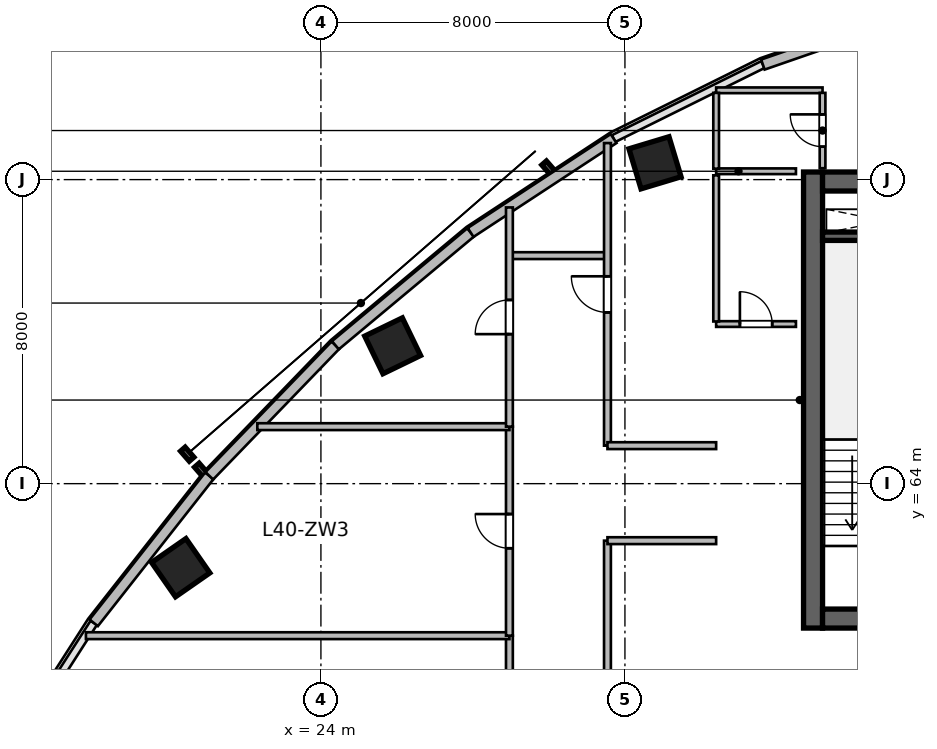
"""IFC4 building model, lengths in metres.
Left out: names, types, materials, properties, quantities, classifications, styles, units other than length and angle.
Written with IfcOpenShell. Run it as: python <this file> out.ifc"""

import sys

from ifc_helpers import new_model, si_unit, direction, frame, frame_2d, origin, origin_2d, place, context, subcontext, project, spatial, rectangle, extrude, source, transform, mapped, element, fill, save


model = new_model("IFC4")
c1 = context("Model", 3, precision=1e-05, world=origin(), true_north=direction((0.0, 1.0)))
c2 = subcontext(c1, "Body", "Model", "MODEL_VIEW")
j1 = project(units=[si_unit("LENGTHUNIT", "METRE"), si_unit("PLANEANGLEUNIT", "RADIAN")], contexts=[c1])
p1 = place(None, origin())
s1 = spatial("IfcSite", under=j1, at=p1, CompositionType="ELEMENT")
p2 = place(p1, origin())
s2 = spatial("IfcBuilding", under=s1, at=p2, CompositionType="ELEMENT")
p3 = place(p2, frame((0.0, 0.0, 166.2)))
s3 = spatial("IfcBuildingStorey", under=s2, at=p3, CompositionType="ELEMENT", Elevation=166.2)
m1 = source(origin(), c2, "Body", "SweptSolid", [
    extrude(rectangle(XDim=12.0, YDim=0.5, at=frame_2d((6.0, 0.0))), origin(), (0.0, 0.0, 1.0), 3.9),
])
p4 = place(p3, frame((36.95, 60.2, 0.0), z_axis=(0.0, 0.0, 1.0), x_axis=(0.0, 1.0, 0.0)))
e1 = element("IfcWall", 1, at=p4, inside=s3, PredefinedType="SHEAR", context=c2, shape_type="MappedRepresentation", body=[
    mapped(m1, transform((0.0, 0.0, 0.0), scale=1.0)),
])
m2 = source(origin(), c2, "Body", "SweptSolid", [
    extrude(rectangle(XDim=21.6, YDim=0.5, at=frame_2d((10.8, 0.0))), origin(), (0.0, 0.0, 1.0), 3.9),
])
p5 = place(p3, frame((37.2, 60.45, 0.0), z_axis=(0.0, 0.0, 1.0), x_axis=(1.0, 0.0, 0.0)))
e2 = element("IfcWall", 2, at=p5, inside=s3, PredefinedType="SHEAR", context=c2, shape_type="MappedRepresentation", body=[
    mapped(m2, transform((0.0, 0.0, 0.0), scale=1.0)),
])
p6 = place(p5, frame((1.1, 0.0, 0.0)))
e3 = element("IfcOpeningElement", 3, at=p6, cuts=e2, PredefinedType="OPENING", context=c2, shape_type="SweptSolid", body=[
    extrude(rectangle(XDim=1.15, YDim=2.15, at=frame_2d((0.575, 1.075))), frame((0.0, 0.26, 0.0), z_axis=(0.0, -1.0, 0.0), x_axis=(1.0, 0.0, 0.0)), (0.0, 0.0, 1.0), 0.52),
])
p7 = place(p5, frame((19.5, 0.0, 0.0)))
e4 = element("IfcOpeningElement", 4, at=p7, cuts=e2, PredefinedType="OPENING", context=c2, shape_type="SweptSolid", body=[
    extrude(rectangle(XDim=0.9, YDim=2.1, at=frame_2d((0.45, 1.05))), frame((0.0, 0.26, 0.0), z_axis=(0.0, -1.0, 0.0), x_axis=(1.0, 0.0, 0.0)), (0.0, 0.0, 1.0), 0.52),
])
p8 = place(p5, frame((12.02, 0.0, 0.0)))
e5 = element("IfcOpeningElement", 5, at=p8, cuts=e2, PredefinedType="OPENING", context=c2, shape_type="SweptSolid", body=[
    extrude(rectangle(XDim=1.6, YDim=2.15, at=frame_2d((0.8, 1.075))), frame((0.0, 0.26, 0.0), z_axis=(0.0, -1.0, 0.0), x_axis=(1.0, 0.0, 0.0)), (0.0, 0.0, 1.0), 0.52),
])
p9 = place(p3, frame((37.2, 71.95, 0.0), z_axis=(0.0, 0.0, 1.0), x_axis=(1.0, 0.0, 0.0)))
e6 = element("IfcWall", 6, at=p9, inside=s3, PredefinedType="SHEAR", context=c2, shape_type="MappedRepresentation", body=[
    mapped(m2, transform((0.0, 0.0, 0.0), scale=1.0)),
])
p10 = place(p9, frame((1.2, 0.0, 0.0)))
e7 = element("IfcOpeningElement", 7, at=p10, cuts=e6, PredefinedType="OPENING", context=c2, shape_type="SweptSolid", body=[
    extrude(rectangle(XDim=0.9, YDim=2.1, at=frame_2d((0.45, 1.05))), frame((0.0, 0.26, 0.0), z_axis=(0.0, -1.0, 0.0), x_axis=(1.0, 0.0, 0.0)), (0.0, 0.0, 1.0), 0.52),
])
p11 = place(p9, frame((14.7, 0.0, 0.0)))
e8 = element("IfcOpeningElement", 8, at=p11, cuts=e6, PredefinedType="OPENING", context=c2, shape_type="SweptSolid", body=[
    extrude(rectangle(XDim=1.2, YDim=2.15, at=frame_2d((0.6, 1.075))), frame((0.0, 0.26, 0.0), z_axis=(0.0, -1.0, 0.0), x_axis=(1.0, 0.0, 0.0)), (0.0, 0.0, 1.0), 0.52),
])
p12 = place(p9, frame((4.15, 0.0, 0.0)))
e9 = element("IfcOpeningElement", 9, at=p12, cuts=e6, PredefinedType="OPENING", context=c2, shape_type="SweptSolid", body=[
    extrude(rectangle(XDim=1.3, YDim=2.15, at=frame_2d((0.65, 1.075))), frame((0.0, 0.26, 0.0), z_axis=(0.0, -1.0, 0.0), x_axis=(1.0, 0.0, 0.0)), (0.0, 0.0, 1.0), 0.52),
])
p13 = place(p9, frame((7.25, 0.0, 0.0)))
e10 = element("IfcOpeningElement", 10, at=p13, cuts=e6, PredefinedType="OPENING", context=c2, shape_type="SweptSolid", body=[
    extrude(rectangle(XDim=0.9, YDim=2.1, at=frame_2d((0.45, 1.05))), frame((0.0, 0.26, 0.0), z_axis=(0.0, -1.0, 0.0), x_axis=(1.0, 0.0, 0.0)), (0.0, 0.0, 1.0), 0.52),
])
p14 = place(p9, frame((10.95, 0.0, 0.0)))
e11 = element("IfcOpeningElement", 11, at=p14, cuts=e6, PredefinedType="OPENING", context=c2, shape_type="SweptSolid", body=[
    extrude(rectangle(XDim=0.9, YDim=2.1, at=frame_2d((0.45, 1.05))), frame((0.0, 0.26, 0.0), z_axis=(0.0, -1.0, 0.0), x_axis=(1.0, 0.0, 0.0)), (0.0, 0.0, 1.0), 0.52),
])
m3 = source(origin(), c2, "Body", "SweptSolid", [
    extrude(rectangle(XDim=3.27, YDim=0.22, at=frame_2d((1.635, 0.0))), origin(), (0.0, 0.0, 1.0), 3.9),
])
p15 = place(p3, frame((37.2, 70.51, 0.0), z_axis=(0.0, 0.0, 1.0), x_axis=(1.0, 0.0, 0.0)))
e12 = element("IfcWall", 12, at=p15, inside=s3, PredefinedType="SHEAR", context=c2, shape_type="MappedRepresentation", body=[
    mapped(m3, transform((0.0, 0.0, 0.0), scale=1.0)),
])
m4 = source(origin(), c2, "Body", "SweptSolid", [
    extrude(rectangle(XDim=1.1, YDim=1.1, at=origin_2d()), origin(), (0.0, 0.0, 1.0), 3.9),
])
for number, where, z_axis, x_axis in (
    (13, (20.311, 61.789, 0.0), (0.0, 0.0, 1.0), (-0.571, 0.821, 0.0)),
    (14, (25.888, 67.627, 0.0), (0.0, 0.0, 1.0), (-0.436, 0.9, 0.0)),
    (15, (32.791, 72.442, 0.0), (0.0, 0.0, 1.0), (-0.289, 0.957, 0.0)),
):
    element("IfcColumn", number, at=place(p3, frame(where, z_axis=z_axis, x_axis=x_axis)), inside=s3, PredefinedType="COLUMN", context=c2, shape_type="MappedRepresentation", body=[
        mapped(m4, transform((0.0, 0.0, 0.0), scale=1.0)),
    ])
m5 = source(origin(), c2, "Body", "SweptSolid", [
    extrude(rectangle(XDim=4.922, YDim=0.28, at=frame_2d((2.461, 0.0))), origin(), (0.0, 0.0, 1.0), 3.65),
])
p16 = place(p3, frame((18.021, 60.338, 0.0), z_axis=(0.0, 0.0, 1.0), x_axis=(0.61817639101, 0.786039407153, 0.0)))
e16 = element("IfcWall", 16, at=p16, inside=s3, PredefinedType="SOLIDWALL", context=c2, shape_type="MappedRepresentation", body=[
    mapped(m5, transform((0.0, 0.0, 0.0), scale=1.0)),
])
m6 = source(origin(), c2, "Body", "SweptSolid", [
    extrude(rectangle(XDim=4.776, YDim=0.28, at=frame_2d((2.388, 0.0))), origin(), (0.0, 0.0, 1.0), 3.65),
])
p17 = place(p3, frame((21.064, 64.206, 0.0), z_axis=(0.0, 0.0, 1.0), x_axis=(0.694601811851, 0.719394414055, 0.0)))
e17 = element("IfcWall", 17, at=p17, inside=s3, PredefinedType="SOLIDWALL", context=c2, shape_type="MappedRepresentation", body=[
    mapped(m6, transform((0.0, 0.0, 0.0), scale=1.0)),
])
m7 = source(origin(), c2, "Body", "SweptSolid", [
    extrude(rectangle(XDim=4.634, YDim=0.28, at=frame_2d((2.317, 0.0))), origin(), (0.0, 0.0, 1.0), 3.65),
])
p18 = place(p3, frame((24.381, 67.642, 0.0), z_axis=(0.0, 0.0, 1.0), x_axis=(0.767910229096, 0.640557475993, 0.0)))
e18 = element("IfcWall", 18, at=p18, inside=s3, PredefinedType="SOLIDWALL", context=c2, shape_type="MappedRepresentation", body=[
    mapped(m7, transform((0.0, 0.0, 0.0), scale=1.0)),
])
m8 = source(origin(), c2, "Body", "SweptSolid", [
    extrude(rectangle(XDim=4.501, YDim=0.28, at=frame_2d((2.25, 0.0))), origin(), (0.0, 0.0, 1.0), 3.65),
])
p19 = place(p3, frame((27.939, 70.61, 0.0), z_axis=(0.0, 0.0, 1.0), x_axis=(0.835984920737, 0.548752414391, 0.0)))
e19 = element("IfcWall", 19, at=p19, inside=s3, PredefinedType="SOLIDWALL", context=c2, shape_type="MappedRepresentation", body=[
    mapped(m8, transform((0.0, 0.0, 0.0), scale=1.0)),
])
m9 = source(origin(), c2, "Body", "SweptSolid", [
    extrude(rectangle(XDim=4.29, YDim=0.28, at=frame_2d((2.145, 0.0))), origin(), (0.0, 0.0, 1.0), 3.65),
])
p20 = place(p3, frame((35.63, 75.027, 0.0), z_axis=(0.0, 0.0, 1.0), x_axis=(0.944883859218, 0.3274057003, 0.0)))
e20 = element("IfcWall", 20, at=p20, inside=s3, PredefinedType="SOLIDWALL", context=c2, shape_type="MappedRepresentation", body=[
    mapped(m9, transform((0.0, 0.0, 0.0), scale=1.0)),
])
m10 = source(origin(), c2, "Body", "SweptSolid", [
    extrude(rectangle(XDim=2.1, YDim=0.15, at=frame_2d((1.05, 0.0))), origin(), (0.0, 0.0, 1.0), 3.65),
])
p21 = place(p3, frame((34.4, 72.22, 0.0), z_axis=(0.0, 0.0, 1.0), x_axis=(1.0, 0.0, 0.0)))
e21 = element("IfcWall", 21, at=p21, inside=s3, PredefinedType="PARTITIONING", context=c2, shape_type="MappedRepresentation", body=[
    mapped(m10, transform((0.0, 0.0, 0.0), scale=1.0)),
])
m11 = source(origin(), c2, "Body", "SweptSolid", [
    extrude(rectangle(XDim=2.8, YDim=0.15, at=frame_2d((1.4, 0.0))), origin(), (0.0, 0.0, 1.0), 3.65),
])
p22 = place(p3, frame((34.4, 74.35, 0.0), z_axis=(0.0, 0.0, 1.0), x_axis=(1.0, 0.0, 0.0)))
e22 = element("IfcWall", 22, at=p22, inside=s3, PredefinedType="PARTITIONING", context=c2, shape_type="MappedRepresentation", body=[
    mapped(m11, transform((0.0, 0.0, 0.0), scale=1.0)),
])
m12 = source(origin(), c2, "Body", "SweptSolid", [
    extrude(rectangle(XDim=1.995, YDim=0.15, at=frame_2d((0.998, 0.0))), origin(), (0.0, 0.0, 1.0), 3.65),
])
p23 = place(p3, frame((34.4, 72.288, 0.0), z_axis=(0.0, 0.0, 1.0), x_axis=(0.0, 1.0, 0.0)))
e23 = element("IfcWall", 23, at=p23, inside=s3, PredefinedType="PARTITIONING", context=c2, shape_type="MappedRepresentation", body=[
    mapped(m12, transform((0.0, 0.0, 0.0), scale=1.0)),
])
m13 = source(origin(), c2, "Body", "SweptSolid", [
    extrude(rectangle(XDim=1.982, YDim=0.15, at=frame_2d((0.991, 0.0))), origin(), (0.0, 0.0, 1.0), 3.65),
])
p24 = place(p3, frame((37.2, 72.3, 0.0), z_axis=(0.0, 0.0, 1.0), x_axis=(0.0, 1.0, 0.0)))
e24 = element("IfcWall", 24, at=p24, inside=s3, PredefinedType="PARTITIONING", context=c2, shape_type="MappedRepresentation", body=[
    mapped(m13, transform((0.0, 0.0, 0.0), scale=1.0)),
])
p25 = place(p24, frame((0.566, 0.0, 0.0)))
e25 = element("IfcOpeningElement", 25, at=p25, cuts=e24, PredefinedType="OPENING", context=c2, shape_type="SweptSolid", body=[
    extrude(rectangle(XDim=0.85, YDim=2.1, at=frame_2d((0.425, 1.05))), frame((0.0, 0.085, 0.0), z_axis=(0.0, -1.0, 0.0), x_axis=(1.0, 0.0, 0.0)), (0.0, 0.0, 1.0), 0.17),
])
p26 = place(p3, frame((34.4, 68.2, 0.0), z_axis=(0.0, 0.0, 1.0), x_axis=(1.0, 0.0, 0.0)))
e26 = element("IfcWall", 26, at=p26, inside=s3, PredefinedType="PARTITIONING", context=c2, shape_type="MappedRepresentation", body=[
    mapped(m10, transform((0.0, 0.0, 0.0), scale=1.0)),
])
p27 = place(p26, frame((0.625, 0.0, 0.0)))
e27 = element("IfcOpeningElement", 27, at=p27, cuts=e26, PredefinedType="OPENING", context=c2, shape_type="SweptSolid", body=[
    extrude(rectangle(XDim=0.85, YDim=2.1, at=frame_2d((0.425, 1.05))), frame((0.0, 0.085, 0.0), z_axis=(0.0, -1.0, 0.0), x_axis=(1.0, 0.0, 0.0)), (0.0, 0.0, 1.0), 0.17),
])
m14 = source(origin(), c2, "Body", "SweptSolid", [
    extrude(rectangle(XDim=3.845, YDim=0.15, at=frame_2d((1.922, 0.0))), origin(), (0.0, 0.0, 1.0), 3.65),
])
p28 = place(p3, frame((34.4, 68.268, 0.0), z_axis=(0.0, 0.0, 1.0), x_axis=(0.0, 1.0, 0.0)))
e28 = element("IfcWall", 28, at=p28, inside=s3, PredefinedType="PARTITIONING", context=c2, shape_type="MappedRepresentation", body=[
    mapped(m14, transform((0.0, 0.0, 0.0), scale=1.0)),
])
m15 = source(origin(), c2, "Body", "SweptSolid", [
    extrude(rectangle(XDim=2.5, YDim=0.18, at=frame_2d((1.25, 0.0))), origin(), (0.0, 0.0, 1.0), 3.022),
])
p29 = place(p3, frame((29.0, 70.0, 0.0), z_axis=(0.0, 0.0, 1.0), x_axis=(1.0, 0.0, 0.0)))
e29 = element("IfcWall", 29, at=p29, inside=s3, PredefinedType="PLUMBINGWALL", context=c2, shape_type="MappedRepresentation", body=[
    mapped(m15, transform((0.0, 0.0, 0.0), scale=1.0)),
])
m16 = source(origin(), c2, "Body", "SweptSolid", [
    extrude(rectangle(XDim=6.5, YDim=0.18, at=frame_2d((3.25, 0.0))), origin(), (0.0, 0.0, 1.0), 3.081),
])
p30 = place(p3, frame((28.96, 53.5, 0.0), z_axis=(0.0, 0.0, 1.0), x_axis=(0.0, 1.0, 0.0)))
e30 = element("IfcWall", 30, at=p30, inside=s3, PredefinedType="PLUMBINGWALL", context=c2, shape_type="MappedRepresentation", body=[
    mapped(m16, transform((0.0, 0.0, 0.0), scale=1.0)),
])
p31 = place(p30, frame((2.8, 0.0, 0.0)))
e31 = element("IfcOpeningElement", 31, at=p31, cuts=e30, PredefinedType="OPENING", context=c2, shape_type="SweptSolid", body=[
    extrude(rectangle(XDim=0.9, YDim=2.08, at=frame_2d((0.45, 1.04))), frame((0.0, 0.1, 0.0), z_axis=(0.0, -1.0, 0.0), x_axis=(1.0, 0.0, 0.0)), (0.0, 0.0, 1.0), 0.2),
])
m17 = source(origin(), c2, "Body", "SweptSolid", [
    extrude(rectangle(XDim=11.144, YDim=0.18, at=frame_2d((5.572, 0.0))), origin(), (0.0, 0.0, 1.0), 3.65),
])
p32 = place(p3, frame((17.816, 60.0, 0.0), z_axis=(0.0, 0.0, 1.0), x_axis=(1.0, 0.0, 0.0)))
e32 = element("IfcWall", 32, at=p32, inside=s3, PredefinedType="PLUMBINGWALL", context=c2, shape_type="MappedRepresentation", body=[
    mapped(m17, transform((0.0, 0.0, 0.0), scale=1.0)),
])
m18 = source(origin(), c2, "Body", "SweptSolid", [
    extrude(rectangle(XDim=5.5, YDim=0.18, at=frame_2d((2.75, 0.0))), origin(), (0.0, 0.0, 1.0), 2.942),
])
p33 = place(p3, frame((28.96, 60.0, 0.0), z_axis=(0.0, 0.0, 1.0), x_axis=(0.0, 1.0, 0.0)))
e33 = element("IfcWall", 33, at=p33, inside=s3, PredefinedType="PLUMBINGWALL", context=c2, shape_type="MappedRepresentation", body=[
    mapped(m18, transform((0.0, 0.0, 0.0), scale=1.0)),
])
p34 = place(p33, frame((2.3, 0.0, 0.0)))
e34 = element("IfcOpeningElement", 34, at=p34, cuts=e33, PredefinedType="OPENING", context=c2, shape_type="SweptSolid", body=[
    extrude(rectangle(XDim=0.9, YDim=2.08, at=frame_2d((0.45, 1.04))), frame((0.0, 0.1, 0.0), z_axis=(0.0, -1.0, 0.0), x_axis=(1.0, 0.0, 0.0)), (0.0, 0.0, 1.0), 0.2),
])
m19 = source(origin(), c2, "Body", "SweptSolid", [
    extrude(rectangle(XDim=6.633, YDim=0.18, at=frame_2d((3.317, 0.0))), origin(), (0.0, 0.0, 1.0), 3.65),
])
p35 = place(p3, frame((22.327, 65.5, 0.0), z_axis=(0.0, 0.0, 1.0), x_axis=(1.0, 0.0, 0.0)))
e35 = element("IfcWall", 35, at=p35, inside=s3, PredefinedType="PLUMBINGWALL", context=c2, shape_type="MappedRepresentation", body=[
    mapped(m19, transform((0.0, 0.0, 0.0), scale=1.0)),
])
m20 = source(origin(), c2, "Body", "SweptSolid", [
    extrude(rectangle(XDim=5.768, YDim=0.18, at=frame_2d((2.884, 0.0))), origin(), (0.0, 0.0, 1.0), 3.65),
])
p36 = place(p3, frame((28.96, 65.5, 0.0), z_axis=(0.0, 0.0, 1.0), x_axis=(0.0, 1.0, 0.0)))
e36 = element("IfcWall", 36, at=p36, inside=s3, PredefinedType="PLUMBINGWALL", context=c2, shape_type="MappedRepresentation", body=[
    mapped(m20, transform((0.0, 0.0, 0.0), scale=1.0)),
])
p37 = place(p36, frame((2.434, 0.0, 0.0)))
e37 = element("IfcOpeningElement", 37, at=p37, cuts=e36, PredefinedType="OPENING", context=c2, shape_type="SweptSolid", body=[
    extrude(rectangle(XDim=0.9, YDim=2.08, at=frame_2d((0.45, 1.04))), frame((0.0, 0.1, 0.0), z_axis=(0.0, -1.0, 0.0), x_axis=(1.0, 0.0, 0.0)), (0.0, 0.0, 1.0), 0.2),
])
m21 = source(origin(), c2, "Body", "SweptSolid", [
    extrude(rectangle(XDim=16.106, YDim=0.18, at=frame_2d((8.053, 0.0))), origin(), (0.0, 0.0, 1.0), 2.942),
])
p38 = place(p3, frame((31.54, 46.394, 0.0), z_axis=(0.0, 0.0, 1.0), x_axis=(0.0, 1.0, 0.0)))
e38 = element("IfcWall", 38, at=p38, inside=s3, PredefinedType="PLUMBINGWALL", context=c2, shape_type="MappedRepresentation", body=[
    mapped(m21, transform((0.0, 0.0, 0.0), scale=1.0)),
])
p39 = place(p38, frame((7.578, 0.0, 0.0)))
e39 = element("IfcOpeningElement", 39, at=p39, cuts=e38, PredefinedType="OPENING", context=c2, shape_type="SweptSolid", body=[
    extrude(rectangle(XDim=0.95, YDim=2.1, at=frame_2d((0.475, 1.05))), frame((0.0, 0.1, 0.0), z_axis=(0.0, -1.0, 0.0), x_axis=(1.0, 0.0, 0.0)), (0.0, 0.0, 1.0), 0.2),
])
m22 = source(origin(), c2, "Body", "SweptSolid", [
    extrude(rectangle(XDim=2.86, YDim=0.18, at=frame_2d((1.43, 0.0))), origin(), (0.0, 0.0, 1.0), 3.65),
])
p40 = place(p3, frame((31.54, 62.5, 0.0), z_axis=(0.0, 0.0, 1.0), x_axis=(1.0, 0.0, 0.0)))
e40 = element("IfcWall", 40, at=p40, inside=s3, PredefinedType="PLUMBINGWALL", context=c2, shape_type="MappedRepresentation", body=[
    mapped(m22, transform((0.0, 0.0, 0.0), scale=1.0)),
])
m23 = source(origin(), c2, "Body", "SweptSolid", [
    extrude(rectangle(XDim=7.962, YDim=0.18, at=frame_2d((3.981, 0.0))), origin(), (0.0, 0.0, 1.0), 3.65),
])
p41 = place(p3, frame((31.54, 65.0, 0.0), z_axis=(0.0, 0.0, 1.0), x_axis=(0.0, 1.0, 0.0)))
e41 = element("IfcWall", 41, at=p41, inside=s3, PredefinedType="PLUMBINGWALL", context=c2, shape_type="MappedRepresentation", body=[
    mapped(m23, transform((0.0, 0.0, 0.0), scale=1.0)),
])
p42 = place(p41, frame((3.506, 0.0, 0.0)))
e42 = element("IfcOpeningElement", 42, at=p42, cuts=e41, PredefinedType="OPENING", context=c2, shape_type="SweptSolid", body=[
    extrude(rectangle(XDim=0.95, YDim=2.1, at=frame_2d((0.475, 1.05))), frame((0.0, 0.1, 0.0), z_axis=(0.0, -1.0, 0.0), x_axis=(1.0, 0.0, 0.0)), (0.0, 0.0, 1.0), 0.2),
])
p43 = place(p3, frame((31.54, 65.0, 0.0), z_axis=(0.0, 0.0, 1.0), x_axis=(1.0, 0.0, 0.0)))
e43 = element("IfcWall", 43, at=p43, inside=s3, PredefinedType="PLUMBINGWALL", context=c2, shape_type="MappedRepresentation", body=[
    mapped(m22, transform((0.0, 0.0, 0.0), scale=1.0)),
])
m24 = source(origin(), c2, "Body", "SweptSolid", [
    extrude(rectangle(XDim=0.85, YDim=2.1, at=frame_2d((0.425, 1.05))), frame((0.0, 0.025, 0.0), z_axis=(0.0, -1.0, 0.0), x_axis=(1.0, 0.0, 0.0)), (0.0, 0.0, 1.0), 0.05),
])
p44 = place(p25, origin())
e44 = element("IfcDoor", 44, at=p44, inside=s3, OperationType="SINGLE_SWING_RIGHT", PredefinedType="DOOR", context=c2, shape_type="MappedRepresentation", body=[
    mapped(m24, transform((0.0, 0.0, 0.0), scale=1.0)),
])
fill(e25, e44)
p45 = place(p27, origin())
e45 = element("IfcDoor", 45, at=p45, inside=s3, OperationType="SINGLE_SWING_LEFT", PredefinedType="DOOR", context=c2, shape_type="MappedRepresentation", body=[
    mapped(m24, transform((0.0, 0.0, 0.0), scale=1.0)),
])
fill(e27, e45)
m25 = source(origin(), c2, "Body", "SweptSolid", [
    extrude(rectangle(XDim=0.9, YDim=2.08, at=frame_2d((0.45, 1.04))), frame((0.0, 0.025, 0.0), z_axis=(0.0, -1.0, 0.0), x_axis=(1.0, 0.0, 0.0)), (0.0, 0.0, 1.0), 0.05),
])
p46 = place(p34, origin())
e46 = element("IfcDoor", 46, at=p46, inside=s3, OperationType="SINGLE_SWING_RIGHT", PredefinedType="DOOR", context=c2, shape_type="MappedRepresentation", body=[
    mapped(m25, transform((0.0, 0.0, 0.0), scale=1.0)),
])
fill(e34, e46)
p47 = place(p37, origin())
e47 = element("IfcDoor", 47, at=p47, inside=s3, OperationType="SINGLE_SWING_LEFT", PredefinedType="DOOR", context=c2, shape_type="MappedRepresentation", body=[
    mapped(m25, transform((0.0, 0.0, 0.0), scale=1.0)),
])
fill(e37, e47)
m26 = source(origin(), c2, "Body", "SweptSolid", [
    extrude(rectangle(XDim=0.95, YDim=2.1, at=frame_2d((0.475, 1.05))), frame((0.0, 0.025, 0.0), z_axis=(0.0, -1.0, 0.0), x_axis=(1.0, 0.0, 0.0)), (0.0, 0.0, 1.0), 0.05),
])
p48 = place(p42, origin())
e48 = element("IfcDoor", 48, at=p48, inside=s3, OperationType="SINGLE_SWING_RIGHT", PredefinedType="DOOR", context=c2, shape_type="MappedRepresentation", body=[
    mapped(m26, transform((0.0, 0.0, 0.0), scale=1.0)),
])
fill(e42, e48)
save(model, sys.argv[1])
